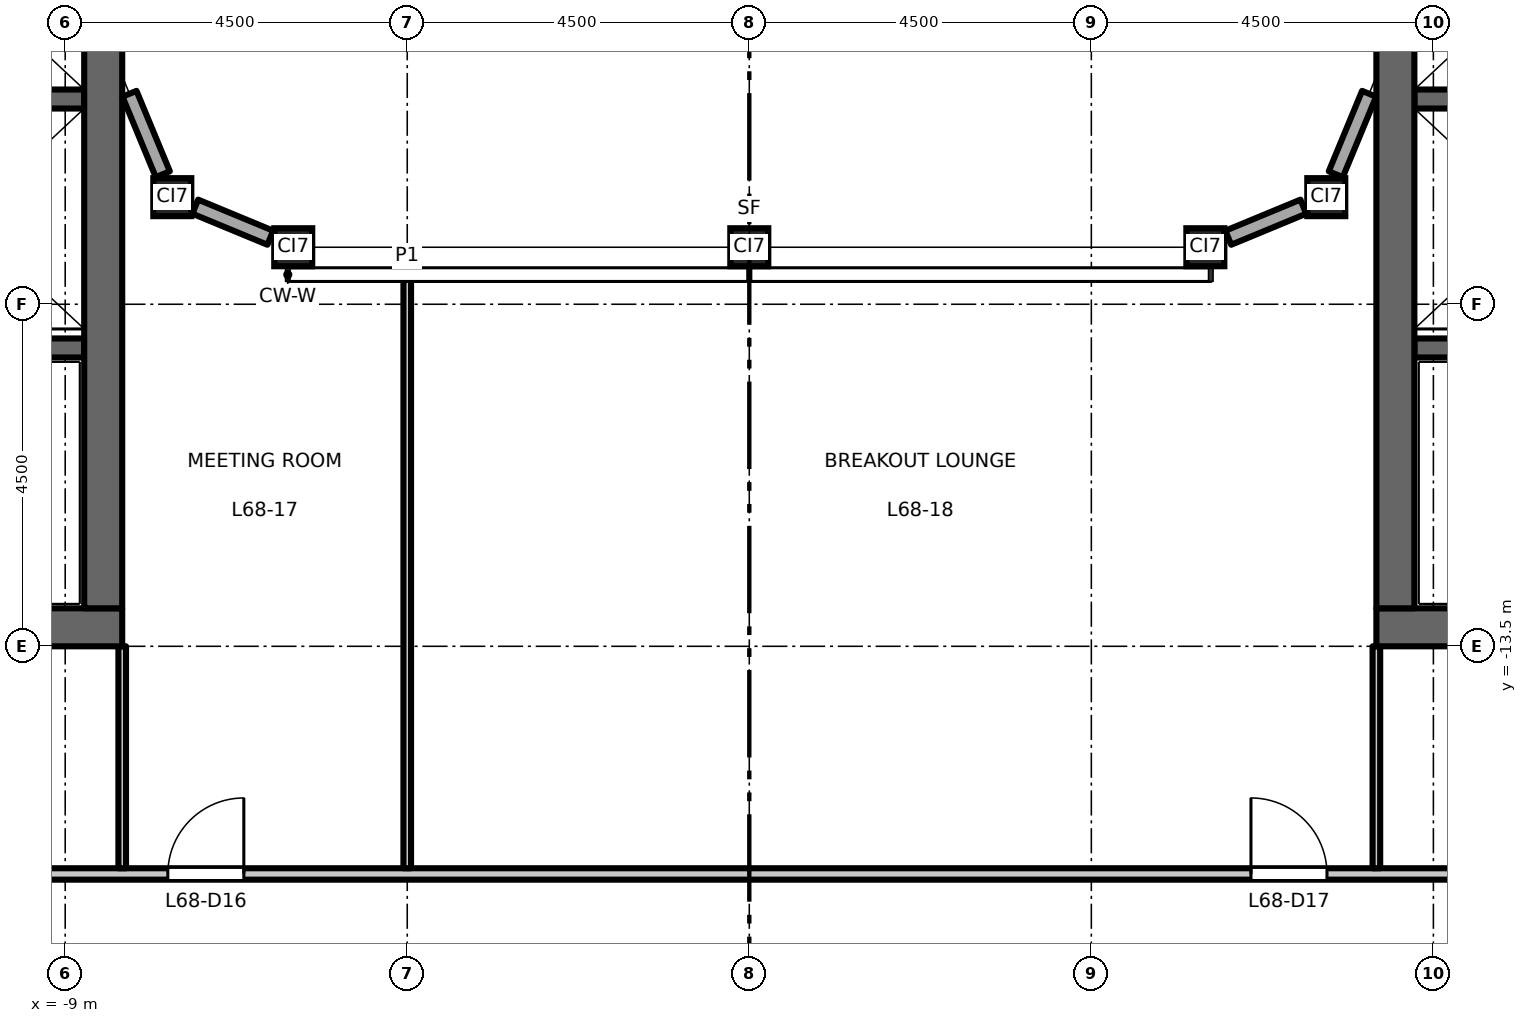
"""IFC4 building model, lengths in metres.
Left out: names, types, materials, properties, quantities, classifications, styles, units other than length and angle.
Written with IfcOpenShell. Run it as: python <this file> out.ifc"""

import sys

from ifc_helpers import new_model, si_unit, direction, frame, frame_2d, origin, origin_2d, place, context, subcontext, project, spatial, rectangle, hollow_rectangle, extrude, element, fill, save


model = new_model("IFC4")
c1 = context("Model", 3, precision=1e-05, world=origin(), true_north=direction((0.0, 1.0)))
c2 = subcontext(c1, "Body", "Model", "MODEL_VIEW")
j1 = project(units=[si_unit("LENGTHUNIT", "METRE"), si_unit("PLANEANGLEUNIT", "RADIAN")], contexts=[c1])
p1 = place(None, origin())
s1 = spatial("IfcSite", under=j1, at=p1, CompositionType="ELEMENT")
p2 = place(p1, origin())
s2 = spatial("IfcBuilding", under=s1, at=p2, CompositionType="ELEMENT")
p3 = place(p2, frame((0.0, 0.0, 316.7)))
s3 = spatial("IfcBuildingStorey", under=s2, at=p3, CompositionType="ELEMENT", Elevation=316.7)
for number, where, z_axis, x_axis in (
    (1, (-7.591, -7.591, 0.0), (0.0, 0.0, 1.0), (1.0, 0.0, 0.0)),
    (2, (-6.0, -8.25, 0.0), (0.0, 0.0, 1.0), (1.0, 0.0, 0.0)),
    (3, (0.0, -8.25, 0.0), (0.0, 0.0, 1.0), (1.0, 0.0, 0.0)),
    (4, (6.0, -8.25, 0.0), (0.0, 0.0, 1.0), (1.0, 0.0, 0.0)),
    (5, (7.591, -7.591, 0.0), (0.0, 0.0, 1.0), (1.0, 0.0, 0.0)),
):
    element("IfcColumn", number, at=place(p3, frame(where, z_axis=z_axis, x_axis=x_axis)), inside=s3, PredefinedType="COLUMN", context=c2, shape_type="SweptSolid", body=[
        extrude(hollow_rectangle(XDim=0.5, YDim=0.5, WallThickness=0.025, at=origin_2d()), origin(), (0.0, 0.0, 1.0), 4.5),
    ])
p4 = place(p3, frame((-8.75, -6.3, 0.0), z_axis=(0.0, 0.0, 1.0), x_axis=(-1.0, 0.0, 0.0)))
e6 = element("IfcWall", 6, at=p4, inside=s3, PredefinedType="SHEAR", context=c2, shape_type="SweptSolid", body=[
    extrude(rectangle(XDim=3.1, YDim=0.25, at=frame_2d((1.55, 0.0))), origin(), (0.0, 0.0, 1.0), 4.35),
])
p5 = place(p3, frame((-8.75, -9.575, 0.0), z_axis=(0.0, 0.0, 1.0), x_axis=(-1.0, 0.0, 0.0)))
e7 = element("IfcWall", 7, at=p5, inside=s3, PredefinedType="SHEAR", context=c2, shape_type="SweptSolid", body=[
    extrude(rectangle(XDim=8.0, YDim=0.25, at=frame_2d((4.0, 0.0))), origin(), (0.0, 0.0, 1.0), 4.35),
])
p6 = place(p5, frame((6.65, 0.0, 0.0)))
e8 = element("IfcOpeningElement", 8, at=p6, cuts=e7, PredefinedType="OPENING", context=c2, shape_type="SweptSolid", body=[
    extrude(rectangle(XDim=1.1, YDim=2.1, at=frame_2d((0.55, 1.05))), frame((0.0, 0.135, 0.0), z_axis=(0.0, -1.0, 0.0), x_axis=(1.0, 0.0, 0.0)), (0.0, 0.0, 1.0), 0.27),
])
p7 = place(p3, frame((-8.25, -13.25, 0.0), z_axis=(0.0, 0.0, 1.0), x_axis=(-1.0, 0.0, 0.0)))
e9 = element("IfcWall", 9, at=p7, inside=s3, PredefinedType="SHEAR", context=c2, shape_type="SweptSolid", body=[
    extrude(rectangle(XDim=9.0, YDim=0.5, at=frame_2d((4.5, 0.0))), origin(), (0.0, 0.0, 1.0), 4.35),
])
p8 = place(p3, frame((-8.5, -13.0, 0.0), z_axis=(0.0, 0.0, 1.0), x_axis=(0.0, 1.0, 0.0)))
e10 = element("IfcWall", 10, at=p8, inside=s3, PredefinedType="SHEAR", context=c2, shape_type="SweptSolid", body=[
    extrude(rectangle(XDim=26.0, YDim=0.5, at=frame_2d((13.0, 0.0))), origin(), (0.0, 0.0, 1.0), 4.35),
])
p9 = place(p3, frame((8.75, -6.3, 0.0), z_axis=(0.0, 0.0, 1.0), x_axis=(1.0, 0.0, 0.0)))
e11 = element("IfcWall", 11, at=p9, inside=s3, PredefinedType="SHEAR", context=c2, shape_type="SweptSolid", body=[
    extrude(rectangle(XDim=3.1, YDim=0.25, at=frame_2d((1.55, 0.0))), origin(), (0.0, 0.0, 1.0), 4.35),
])
p10 = place(p3, frame((8.75, -9.575, 0.0), z_axis=(0.0, 0.0, 1.0), x_axis=(1.0, 0.0, 0.0)))
e12 = element("IfcWall", 12, at=p10, inside=s3, PredefinedType="SHEAR", context=c2, shape_type="SweptSolid", body=[
    extrude(rectangle(XDim=8.0, YDim=0.25, at=frame_2d((4.0, 0.0))), origin(), (0.0, 0.0, 1.0), 4.35),
])
p11 = place(p10, frame((6.65, 0.0, 0.0)))
e13 = element("IfcOpeningElement", 13, at=p11, cuts=e12, PredefinedType="OPENING", context=c2, shape_type="SweptSolid", body=[
    extrude(rectangle(XDim=1.1, YDim=2.1, at=frame_2d((0.55, 1.05))), frame((0.0, 0.135, 0.0), z_axis=(0.0, -1.0, 0.0), x_axis=(1.0, 0.0, 0.0)), (0.0, 0.0, 1.0), 0.27),
])
p12 = place(p3, frame((8.25, -13.25, 0.0), z_axis=(0.0, 0.0, 1.0), x_axis=(1.0, 0.0, 0.0)))
e14 = element("IfcWall", 14, at=p12, inside=s3, PredefinedType="SHEAR", context=c2, shape_type="SweptSolid", body=[
    extrude(rectangle(XDim=9.0, YDim=0.5, at=frame_2d((4.5, 0.0))), origin(), (0.0, 0.0, 1.0), 4.35),
])
p13 = place(p3, frame((8.5, -13.0, 0.0), z_axis=(0.0, 0.0, 1.0), x_axis=(0.0, 1.0, 0.0)))
e15 = element("IfcWall", 15, at=p13, inside=s3, PredefinedType="SHEAR", context=c2, shape_type="SweptSolid", body=[
    extrude(rectangle(XDim=26.0, YDim=0.5, at=frame_2d((13.0, 0.0))), origin(), (0.0, 0.0, 1.0), 4.35),
])
p14 = place(p3, frame((6.302, -8.125, 0.0), z_axis=(0.0, 0.0, 1.0), x_axis=(0.923919409248, 0.382587147216, 0.0)))
e16 = element("IfcWall", 16, at=p14, inside=s3, PredefinedType="STANDARD", context=c2, shape_type="SweptSolid", body=[
    extrude(rectangle(XDim=1.069, YDim=0.2, at=frame_2d((0.534, 0.0))), origin(), (0.0, 0.0, 1.0), 4.01),
])
for number, where, z_axis, x_axis in (
    (17, (7.716, -7.289, 0.0), (0.0, 0.0, 1.0), (0.383, 0.924, 0.0)),
    (18, (-8.154, -6.231, 0.0), (0.0, 0.0, 1.0), (0.383, -0.924, 0.0)),
):
    element("IfcWall", number, at=place(p3, frame(where, z_axis=z_axis, x_axis=x_axis)), inside=s3, PredefinedType="STANDARD", context=c2, shape_type="SweptSolid", body=[
        extrude(rectangle(XDim=1.146, YDim=0.2, at=frame_2d((0.573, 0.0))), origin(), (0.0, 0.0, 1.0), 4.01),
    ])
p15 = place(p3, frame((-7.289, -7.716, 0.0), z_axis=(0.0, 0.0, 1.0), x_axis=(0.923919409248, -0.382587147216, 0.0)))
e19 = element("IfcWall", 19, at=p15, inside=s3, PredefinedType="STANDARD", context=c2, shape_type="SweptSolid", body=[
    extrude(rectangle(XDim=1.069, YDim=0.2, at=frame_2d((0.534, 0.0))), origin(), (0.0, 0.0, 1.0), 4.01),
])
p16 = place(p3, frame((-17.325, -16.495, 0.0), z_axis=(0.0, 0.0, 1.0), x_axis=(1.0, 0.0, 0.0)))
e20 = element("IfcWall", 20, at=p16, inside=s3, PredefinedType="PARTITIONING", context=c2, shape_type="SweptSolid", body=[
    extrude(rectangle(XDim=34.65, YDim=0.15, at=frame_2d((17.325, 0.0))), origin(), (0.0, 0.0, 1.0), 4.35),
])
p17 = place(p16, frame((9.675, 0.0, 0.0)))
e21 = element("IfcOpeningElement", 21, at=p17, cuts=e20, PredefinedType="OPENING", context=c2, shape_type="SweptSolid", body=[
    extrude(rectangle(XDim=1.0, YDim=2.1, at=frame_2d((0.5, 1.05))), frame((0.0, 0.085, 0.0), z_axis=(0.0, -1.0, 0.0), x_axis=(1.0, 0.0, 0.0)), (0.0, 0.0, 1.0), 0.17),
])
p18 = place(p16, frame((23.925, 0.0, 0.0)))
e22 = element("IfcOpeningElement", 22, at=p18, cuts=e20, PredefinedType="OPENING", context=c2, shape_type="SweptSolid", body=[
    extrude(rectangle(XDim=1.0, YDim=2.1, at=frame_2d((0.5, 1.05))), frame((0.0, 0.085, 0.0), z_axis=(0.0, -1.0, 0.0), x_axis=(1.0, 0.0, 0.0)), (0.0, 0.0, 1.0), 0.17),
])
p19 = place(p16, frame((0.675, 0.0, 0.0)))
e23 = element("IfcOpeningElement", 23, at=p19, cuts=e20, PredefinedType="OPENING", context=c2, shape_type="SweptSolid", body=[
    extrude(rectangle(XDim=1.0, YDim=2.1, at=frame_2d((0.5, 1.05))), frame((0.0, 0.085, 0.0), z_axis=(0.0, -1.0, 0.0), x_axis=(1.0, 0.0, 0.0)), (0.0, 0.0, 1.0), 0.17),
])
p20 = place(p16, frame((32.925, 0.0, 0.0)))
e24 = element("IfcOpeningElement", 24, at=p20, cuts=e20, PredefinedType="OPENING", context=c2, shape_type="SweptSolid", body=[
    extrude(rectangle(XDim=1.0, YDim=2.1, at=frame_2d((0.5, 1.05))), frame((0.0, 0.085, 0.0), z_axis=(0.0, -1.0, 0.0), x_axis=(1.0, 0.0, 0.0)), (0.0, 0.0, 1.0), 0.17),
])
p21 = place(p3, frame((-8.25, -16.42, 0.0), z_axis=(0.0, 0.0, 1.0), x_axis=(0.0, 1.0, 0.0)))
e25 = element("IfcWall", 25, at=p21, inside=s3, PredefinedType="PARTITIONING", context=c2, shape_type="SweptSolid", body=[
    extrude(rectangle(XDim=2.92, YDim=0.1, at=frame_2d((1.46, 0.0))), origin(), (0.0, 0.0, 1.0), 4.35),
])
p22 = place(p3, frame((-4.5, -16.42, 0.0), z_axis=(0.0, 0.0, 1.0), x_axis=(0.0, 1.0, 0.0)))
e26 = element("IfcWall", 26, at=p22, inside=s3, PredefinedType="PARTITIONING", context=c2, shape_type="SweptSolid", body=[
    extrude(rectangle(XDim=8.05, YDim=0.1, at=frame_2d((4.025, 0.0))), origin(), (0.0, 0.0, 1.0), 3.65),
])
p23 = place(p3, frame((8.25, -16.42, 0.0), z_axis=(0.0, 0.0, 1.0), x_axis=(0.0, 1.0, 0.0)))
e27 = element("IfcWall", 27, at=p23, inside=s3, PredefinedType="PARTITIONING", context=c2, shape_type="SweptSolid", body=[
    extrude(rectangle(XDim=2.92, YDim=0.1, at=frame_2d((1.46, 0.0))), origin(), (0.0, 0.0, 1.0), 4.35),
])
p24 = place(p17, origin())
e28 = element("IfcDoor", 28, at=p24, inside=s3, OperationType="SINGLE_SWING_RIGHT", PredefinedType="DOOR", context=c2, shape_type="SweptSolid", body=[
    extrude(rectangle(XDim=1.0, YDim=2.1, at=frame_2d((0.5, 1.05))), frame((0.0, 0.025, 0.0), z_axis=(0.0, -1.0, 0.0), x_axis=(1.0, 0.0, 0.0)), (0.0, 0.0, 1.0), 0.05),
])
fill(e21, e28)
p25 = place(p18, origin())
e29 = element("IfcDoor", 29, at=p25, inside=s3, OperationType="SINGLE_SWING_LEFT", PredefinedType="DOOR", context=c2, shape_type="SweptSolid", body=[
    extrude(rectangle(XDim=1.0, YDim=2.1, at=frame_2d((0.5, 1.05))), frame((0.0, 0.025, 0.0), z_axis=(0.0, -1.0, 0.0), x_axis=(1.0, 0.0, 0.0)), (0.0, 0.0, 1.0), 0.05),
])
fill(e22, e29)
save(model, sys.argv[1])
